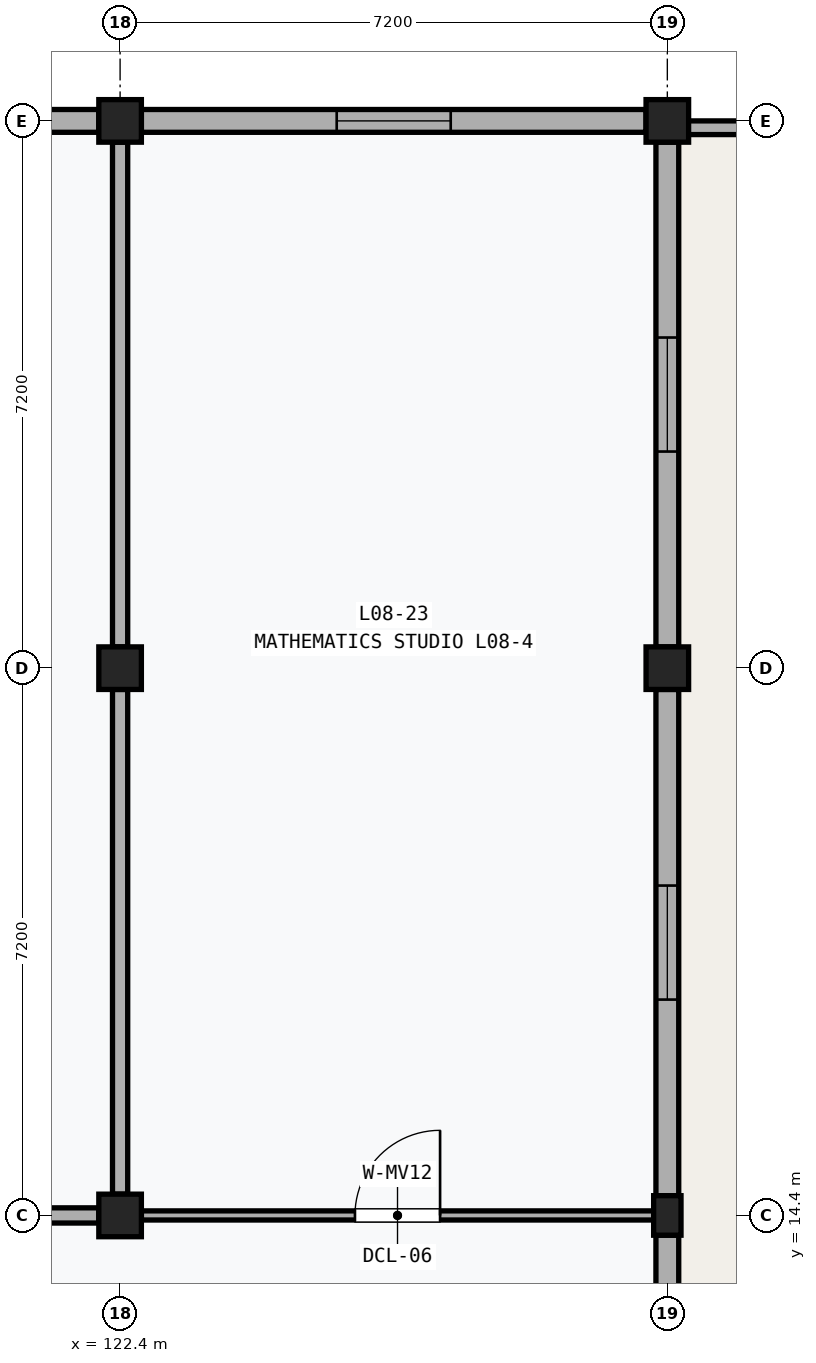
"""IFC4 building model, lengths in metres.
Left out: names, types, materials, properties, quantities, classifications, styles, units other than length and angle.
Written with IfcOpenShell. Run it as: python <this file> out.ifc"""

import sys

from ifc_helpers import new_model, si_unit, direction, frame, frame_2d, origin, origin_2d, place, context, subcontext, project, spatial, rectangle, extrude, element, fill, save


model = new_model("IFC4")
c1 = context("Model", 3, precision=1e-05, world=origin(), true_north=direction((0.0, 1.0)))
c2 = subcontext(c1, "Body", "Model", "MODEL_VIEW")
j1 = project(units=[si_unit("LENGTHUNIT", "METRE"), si_unit("PLANEANGLEUNIT", "RADIAN")], contexts=[c1])
p1 = place(None, origin())
s1 = spatial("IfcSite", under=j1, at=p1, CompositionType="ELEMENT")
p2 = place(p1, origin())
s2 = spatial("IfcBuilding", under=s1, at=p2, CompositionType="ELEMENT")
p3 = place(p2, frame((0.0, 0.0, 34.8)))
s3 = spatial("IfcBuildingStorey", under=s2, at=p3, CompositionType="ELEMENT", Elevation=34.8)
for number, where, z_axis, x_axis in (
    (1, (122.4, 14.4, 0.0), (0.0, 0.0, 1.0), (1.0, 0.0, 0.0)),
    (2, (122.4, 21.6, 0.0), (0.0, 0.0, 1.0), (1.0, 0.0, 0.0)),
    (3, (122.4, 28.8, 0.0), (0.0, 0.0, 1.0), (1.0, 0.0, 0.0)),
):
    element("IfcColumn", number, at=place(p3, frame(where, z_axis=z_axis, x_axis=x_axis)), inside=s3, PredefinedType="COLUMN", context=c2, shape_type="SweptSolid", body=[
        extrude(rectangle(XDim=0.56, YDim=0.56, at=origin_2d()), origin(), (0.0, 0.0, 1.0), 4.0),
    ])
p4 = place(p3, frame((129.6, 14.4, 0.0), z_axis=(0.0, 0.0, 1.0), x_axis=(1.0, 0.0, 0.0)))
e4 = element("IfcColumn", 4, at=p4, inside=s3, PredefinedType="PILASTER", context=c2, shape_type="SweptSolid", body=[
    extrude(rectangle(XDim=0.36, YDim=0.52, at=origin_2d()), origin(), (0.0, 0.0, 1.0), 4.0),
])
for number, where, z_axis, x_axis in (
    (5, (129.6, 21.6, 0.0), (0.0, 0.0, 1.0), (1.0, 0.0, 0.0)),
    (6, (129.6, 28.8, 0.0), (0.0, 0.0, 1.0), (1.0, 0.0, 0.0)),
):
    element("IfcColumn", number, at=place(p3, frame(where, z_axis=z_axis, x_axis=x_axis)), inside=s3, PredefinedType="COLUMN", context=c2, shape_type="SweptSolid", body=[
        extrude(rectangle(XDim=0.56, YDim=0.56, at=origin_2d()), origin(), (0.0, 0.0, 1.0), 4.0),
    ])
p5 = place(p3, frame((115.38, 28.8, 0.0), z_axis=(0.0, 0.0, 1.0), x_axis=(1.0, 0.0, 0.0)))
e7 = element("IfcWall", 7, at=p5, inside=s3, PredefinedType="SOLIDWALL", context=c2, shape_type="SweptSolid", body=[
    extrude(rectangle(XDim=6.74, YDim=0.3, at=frame_2d((3.37, 0.0))), origin(), (0.0, 0.0, 1.0), 3.19),
])
p6 = place(p5, frame((2.62, 0.0, 1.1)))
e8 = element("IfcOpeningElement", 8, at=p6, cuts=e7, PredefinedType="OPENING", context=c2, shape_type="SweptSolid", body=[
    extrude(rectangle(XDim=1.5, YDim=1.35, at=frame_2d((0.75, 0.675))), frame((0.0, 0.162, 0.0), z_axis=(0.0, -1.0, 0.0), x_axis=(1.0, 0.0, 0.0)), (0.0, 0.0, 1.0), 0.324),
])
p7 = place(p3, frame((129.6, 7.48, 0.0), z_axis=(0.0, 0.0, 1.0), x_axis=(0.0, 1.0, 0.0)))
e9 = element("IfcWall", 9, at=p7, inside=s3, PredefinedType="SOLIDWALL", context=c2, shape_type="SweptSolid", body=[
    extrude(rectangle(XDim=6.66, YDim=0.3, at=frame_2d((3.33, 0.0))), origin(), (0.0, 0.0, 1.0), 3.19),
])
p8 = place(p7, frame((2.455, 0.0, 1.2)))
e10 = element("IfcOpeningElement", 10, at=p8, cuts=e9, PredefinedType="OPENING", context=c2, shape_type="SweptSolid", body=[
    extrude(rectangle(XDim=1.75, YDim=1.35, at=frame_2d((0.875, 0.675))), frame((0.0, 0.162, 0.0), z_axis=(0.0, -1.0, 0.0), x_axis=(1.0, 0.0, 0.0)), (0.0, 0.0, 1.0), 0.324),
])
p9 = place(p3, frame((129.6, 14.66, 0.0), z_axis=(0.0, 0.0, 1.0), x_axis=(0.0, 1.0, 0.0)))
e11 = element("IfcWall", 11, at=p9, inside=s3, PredefinedType="SOLIDWALL", context=c2, shape_type="SweptSolid", body=[
    extrude(rectangle(XDim=6.66, YDim=0.3, at=frame_2d((3.33, 0.0))), origin(), (0.0, 0.0, 1.0), 3.19),
])
p10 = place(p9, frame((2.58, 0.0, 1.1)))
e12 = element("IfcOpeningElement", 12, at=p10, cuts=e11, PredefinedType="OPENING", context=c2, shape_type="SweptSolid", body=[
    extrude(rectangle(XDim=1.5, YDim=1.35, at=frame_2d((0.75, 0.675))), frame((0.0, 0.162, 0.0), z_axis=(0.0, -1.0, 0.0), x_axis=(1.0, 0.0, 0.0)), (0.0, 0.0, 1.0), 0.324),
])
p11 = place(p3, frame((122.68, 28.8, 0.0), z_axis=(0.0, 0.0, 1.0), x_axis=(1.0, 0.0, 0.0)))
e13 = element("IfcWall", 13, at=p11, inside=s3, PredefinedType="SOLIDWALL", context=c2, shape_type="SweptSolid", body=[
    extrude(rectangle(XDim=6.64, YDim=0.3, at=frame_2d((3.32, 0.0))), origin(), (0.0, 0.0, 1.0), 3.19),
])
p12 = place(p11, frame((2.57, 0.0, 1.1)))
e14 = element("IfcOpeningElement", 14, at=p12, cuts=e13, PredefinedType="OPENING", context=c2, shape_type="SweptSolid", body=[
    extrude(rectangle(XDim=1.5, YDim=1.35, at=frame_2d((0.75, 0.675))), frame((0.0, 0.162, 0.0), z_axis=(0.0, -1.0, 0.0), x_axis=(1.0, 0.0, 0.0)), (0.0, 0.0, 1.0), 0.324),
])
p13 = place(p3, frame((129.6, 21.88, 0.0), z_axis=(0.0, 0.0, 1.0), x_axis=(0.0, 1.0, 0.0)))
e15 = element("IfcWall", 15, at=p13, inside=s3, PredefinedType="SOLIDWALL", context=c2, shape_type="SweptSolid", body=[
    extrude(rectangle(XDim=6.64, YDim=0.3, at=frame_2d((3.32, 0.0))), origin(), (0.0, 0.0, 1.0), 3.19),
])
p14 = place(p13, frame((2.57, 0.0, 1.1)))
e16 = element("IfcOpeningElement", 16, at=p14, cuts=e15, PredefinedType="OPENING", context=c2, shape_type="SweptSolid", body=[
    extrude(rectangle(XDim=1.5, YDim=1.35, at=frame_2d((0.75, 0.675))), frame((0.0, 0.162, 0.0), z_axis=(0.0, -1.0, 0.0), x_axis=(1.0, 0.0, 0.0)), (0.0, 0.0, 1.0), 0.324),
])
p15 = place(p3, frame((129.69, 28.71, 0.0), z_axis=(0.0, 0.0, 1.0), x_axis=(1.0, 0.0, 0.0)))
e17 = element("IfcWall", 17, at=p15, inside=s3, PredefinedType="PARAPET", context=c2, shape_type="SweptSolid", body=[
    extrude(rectangle(XDim=7.02, YDim=0.18, at=frame_2d((3.51, 0.0))), origin(), (0.0, 0.0, 1.0), 0.95),
])
p16 = place(p3, frame((115.48, 14.4, 0.0), z_axis=(0.0, 0.0, 1.0), x_axis=(1.0, 0.0, 0.0)))
e18 = element("IfcWall", 18, at=p16, inside=s3, PredefinedType="PARTITIONING", context=c2, shape_type="SweptSolid", body=[
    extrude(rectangle(XDim=6.64, YDim=0.2, at=frame_2d((3.32, 0.0))), origin(), (0.0, 0.0, 1.0), 3.03),
])
p17 = place(p16, frame((2.78, 0.0, 0.0)))
e19 = element("IfcOpeningElement", 19, at=p17, cuts=e18, PredefinedType="OPENING", context=c2, shape_type="SweptSolid", body=[
    extrude(rectangle(XDim=1.08, YDim=2.18, at=frame_2d((0.54, 1.09))), frame((0.0, 0.112, 0.0), z_axis=(0.0, -1.0, 0.0), x_axis=(1.0, 0.0, 0.0)), (0.0, 0.0, 1.0), 0.224),
])
for number, where, z_axis, x_axis in (
    (20, (122.4, 14.68, 0.0), (0.0, 0.0, 1.0), (0.0, 1.0, 0.0)),
    (21, (122.4, 21.88, 0.0), (0.0, 0.0, 1.0), (0.0, 1.0, 0.0)),
):
    element("IfcWall", number, at=place(p3, frame(where, z_axis=z_axis, x_axis=x_axis)), inside=s3, PredefinedType="PARTITIONING", context=c2, shape_type="SweptSolid", body=[
        extrude(rectangle(XDim=6.64, YDim=0.2, at=frame_2d((3.32, 0.0))), origin(), (0.0, 0.0, 1.0), 3.03),
    ])
p18 = place(p3, frame((122.68, 14.4, 0.0), z_axis=(0.0, 0.0, 1.0), x_axis=(1.0, 0.0, 0.0)))
e22 = element("IfcWall", 22, at=p18, inside=s3, PredefinedType="MOVABLE", context=c2, shape_type="SweptSolid", body=[
    extrude(rectangle(XDim=6.74, YDim=0.12, at=frame_2d((3.37, 0.0))), origin(), (0.0, 0.0, 1.0), 3.03),
])
p19 = place(p18, frame((2.81, 0.0, 0.0)))
e23 = element("IfcOpeningElement", 23, at=p19, cuts=e22, PredefinedType="OPENING", context=c2, shape_type="SweptSolid", body=[
    extrude(rectangle(XDim=1.12, YDim=2.2, at=frame_2d((0.56, 1.1))), frame((0.0, 0.072, 0.0), z_axis=(0.0, -1.0, 0.0), x_axis=(1.0, 0.0, 0.0)), (0.0, 0.0, 1.0), 0.144),
])
p20 = place(p10, origin())
e24 = element("IfcWindow", 24, at=p20, inside=s3, PartitioningType="SINGLE_PANEL", PredefinedType="WINDOW", context=c2, shape_type="SweptSolid", body=[
    extrude(rectangle(XDim=1.5, YDim=1.35, at=frame_2d((0.75, 0.675))), frame((0.0, 0.03, 0.0), z_axis=(0.0, -1.0, 0.0), x_axis=(1.0, 0.0, 0.0)), (0.0, 0.0, 1.0), 0.06),
])
fill(e12, e24)
p21 = place(p12, origin())
e25 = element("IfcWindow", 25, at=p21, inside=s3, PartitioningType="SINGLE_PANEL", PredefinedType="WINDOW", context=c2, shape_type="SweptSolid", body=[
    extrude(rectangle(XDim=1.5, YDim=1.35, at=frame_2d((0.75, 0.675))), frame((0.0, 0.03, 0.0), z_axis=(0.0, -1.0, 0.0), x_axis=(1.0, 0.0, 0.0)), (0.0, 0.0, 1.0), 0.06),
])
fill(e14, e25)
p22 = place(p14, origin())
e26 = element("IfcWindow", 26, at=p22, inside=s3, PartitioningType="SINGLE_PANEL", PredefinedType="WINDOW", context=c2, shape_type="SweptSolid", body=[
    extrude(rectangle(XDim=1.5, YDim=1.35, at=frame_2d((0.75, 0.675))), frame((0.0, 0.03, 0.0), z_axis=(0.0, -1.0, 0.0), x_axis=(1.0, 0.0, 0.0)), (0.0, 0.0, 1.0), 0.06),
])
fill(e16, e26)
p23 = place(p19, origin())
e27 = element("IfcDoor", 27, at=p23, inside=s3, OperationType="SINGLE_SWING_RIGHT", PredefinedType="DOOR", context=c2, shape_type="SweptSolid", body=[
    extrude(rectangle(XDim=1.12, YDim=2.2, at=frame_2d((0.56, 1.1))), frame((0.0, 0.025, 0.0), z_axis=(0.0, -1.0, 0.0), x_axis=(1.0, 0.0, 0.0)), (0.0, 0.0, 1.0), 0.05),
])
fill(e23, e27)
save(model, sys.argv[1])
